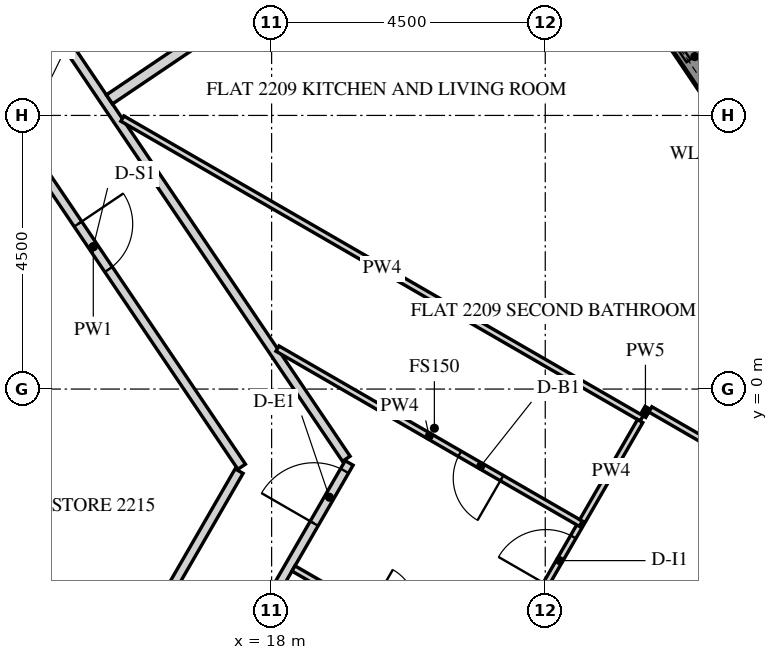
"""IFC4 building model, lengths in metres.
Left out: names, types, materials, properties, quantities, classifications, styles, units other than length and angle.
Written with IfcOpenShell. Run it as: python <this file> out.ifc"""

import sys

from ifc_helpers import new_model, si_unit, direction, frame, frame_2d, origin, place, context, subcontext, project, spatial, polyline, rectangle, outline, extrude, element, fill, save


model = new_model("IFC4")
c1 = context("Model", 3, precision=1e-05, world=origin(), true_north=direction((0.0, 1.0)))
c2 = subcontext(c1, "Body", "Model", "MODEL_VIEW")
j1 = project(units=[si_unit("LENGTHUNIT", "METRE"), si_unit("PLANEANGLEUNIT", "RADIAN")], contexts=[c1])
p1 = place(None, origin())
s1 = spatial("IfcSite", under=j1, at=p1, CompositionType="ELEMENT")
p2 = place(p1, origin())
s2 = spatial("IfcBuilding", under=s1, at=p2, CompositionType="ELEMENT")
p3 = place(p2, frame((0.0, 0.0, 279.6)))
s3 = spatial("IfcBuildingStorey", under=s2, at=p3, CompositionType="ELEMENT", Elevation=279.6)
p4 = place(p3, frame((16.451, -23.005, -0.15), z_axis=(0.0, 0.0, 1.0), x_axis=(0.500003737743, 0.866023245787, 0.0)))
e1 = element("IfcWall", 1, at=p4, inside=s3, PredefinedType="SOLIDWALL", context=c2, shape_type="SweptSolid", body=[
    extrude(outline(polyline([(-0.021, -0.25), (25.468, -0.25), (25.421, 0.25), (0.021, 0.25), (-0.021, -0.25)])), origin(), (0.0, 0.0, 1.0), 3.9),
])
p5 = place(p4, frame((2.522, 0.0, 0.75)))
e2 = element("IfcOpeningElement", 2, at=p5, cuts=e1, PredefinedType="OPENING", context=c2, shape_type="SweptSolid", body=[
    extrude(rectangle(XDim=2.4, YDim=2.7, at=frame_2d((1.2, 1.35))), frame((0.0, 0.26, 0.0), z_axis=(0.0, -1.0, 0.0), x_axis=(1.0, 0.0, 0.0)), (0.0, 0.0, 1.0), 0.52),
])
p6 = place(p4, frame((6.122, 0.0, 0.75)))
e3 = element("IfcOpeningElement", 3, at=p6, cuts=e1, PredefinedType="OPENING", context=c2, shape_type="SweptSolid", body=[
    extrude(rectangle(XDim=2.4, YDim=2.7, at=frame_2d((1.2, 1.35))), frame((0.0, 0.26, 0.0), z_axis=(0.0, -1.0, 0.0), x_axis=(1.0, 0.0, 0.0)), (0.0, 0.0, 1.0), 0.52),
])
p7 = place(p4, frame((9.722, 0.0, 0.75)))
e4 = element("IfcOpeningElement", 4, at=p7, cuts=e1, PredefinedType="OPENING", context=c2, shape_type="SweptSolid", body=[
    extrude(rectangle(XDim=2.4, YDim=2.7, at=frame_2d((1.2, 1.35))), frame((0.0, 0.26, 0.0), z_axis=(0.0, -1.0, 0.0), x_axis=(1.0, 0.0, 0.0)), (0.0, 0.0, 1.0), 0.52),
])
p8 = place(p4, frame((13.323, 0.0, 0.75)))
e5 = element("IfcOpeningElement", 5, at=p8, cuts=e1, PredefinedType="OPENING", context=c2, shape_type="SweptSolid", body=[
    extrude(rectangle(XDim=2.4, YDim=2.7, at=frame_2d((1.2, 1.35))), frame((0.0, 0.26, 0.0), z_axis=(0.0, -1.0, 0.0), x_axis=(1.0, 0.0, 0.0)), (0.0, 0.0, 1.0), 0.52),
])
p9 = place(p4, frame((16.922, 0.0, 0.75)))
e6 = element("IfcOpeningElement", 6, at=p9, cuts=e1, PredefinedType="OPENING", context=c2, shape_type="SweptSolid", body=[
    extrude(rectangle(XDim=2.4, YDim=2.7, at=frame_2d((1.2, 1.35))), frame((0.0, 0.26, 0.0), z_axis=(0.0, -1.0, 0.0), x_axis=(1.0, 0.0, 0.0)), (0.0, 0.0, 1.0), 0.52),
])
p10 = place(p4, frame((20.522, 0.0, 0.75)))
e7 = element("IfcOpeningElement", 7, at=p10, cuts=e1, PredefinedType="OPENING", context=c2, shape_type="SweptSolid", body=[
    extrude(rectangle(XDim=2.4, YDim=2.7, at=frame_2d((1.2, 1.35))), frame((0.0, 0.26, 0.0), z_axis=(0.0, -1.0, 0.0), x_axis=(1.0, 0.0, 0.0)), (0.0, 0.0, 1.0), 0.52),
])
p11 = place(p3, frame((26.706, 2.879, -0.15), z_axis=(0.0, 0.0, 1.0), x_axis=(-0.559197891507, 0.829034208061, 0.0)))
e8 = element("IfcWall", 8, at=p11, inside=s3, PredefinedType="SOLIDWALL", context=c2, shape_type="SweptSolid", body=[
    extrude(outline(polyline([(0.25, -0.25), (22.795, -0.25), (23.295, 0.25), (-0.25, 0.25), (0.25, -0.25)])), origin(), (0.0, 0.0, 1.0), 3.9),
])
p12 = place(p11, frame((1.323, 0.0, 1.05)))
e9 = element("IfcOpeningElement", 9, at=p12, cuts=e8, PredefinedType="OPENING", context=c2, shape_type="SweptSolid", body=[
    extrude(rectangle(XDim=0.9, YDim=1.5, at=frame_2d((0.45, 0.75))), frame((0.0, 0.26, 0.0), z_axis=(0.0, -1.0, 0.0), x_axis=(1.0, 0.0, 0.0)), (0.0, 0.0, 1.0), 0.52),
])
p13 = place(p11, frame((2.522, 0.0, 0.15)))
e10 = element("IfcOpeningElement", 10, at=p13, cuts=e8, PredefinedType="OPENING", context=c2, shape_type="SweptSolid", body=[
    extrude(rectangle(XDim=1.2, YDim=2.4, at=frame_2d((0.6, 1.2))), frame((0.0, 0.26, 0.0), z_axis=(0.0, -1.0, 0.0), x_axis=(1.0, 0.0, 0.0)), (0.0, 0.0, 1.0), 0.52),
])
p14 = place(p11, frame((4.922, 0.0, 1.05)))
e11 = element("IfcOpeningElement", 11, at=p14, cuts=e8, PredefinedType="OPENING", context=c2, shape_type="SweptSolid", body=[
    extrude(rectangle(XDim=0.9, YDim=1.5, at=frame_2d((0.45, 0.75))), frame((0.0, 0.26, 0.0), z_axis=(0.0, -1.0, 0.0), x_axis=(1.0, 0.0, 0.0)), (0.0, 0.0, 1.0), 0.52),
])
p15 = place(p11, frame((6.122, 0.0, 0.15)))
e12 = element("IfcOpeningElement", 12, at=p15, cuts=e8, PredefinedType="OPENING", context=c2, shape_type="SweptSolid", body=[
    extrude(rectangle(XDim=1.2, YDim=2.4, at=frame_2d((0.6, 1.2))), frame((0.0, 0.26, 0.0), z_axis=(0.0, -1.0, 0.0), x_axis=(1.0, 0.0, 0.0)), (0.0, 0.0, 1.0), 0.52),
])
p16 = place(p11, frame((8.522, 0.0, 1.05)))
e13 = element("IfcOpeningElement", 13, at=p16, cuts=e8, PredefinedType="OPENING", context=c2, shape_type="SweptSolid", body=[
    extrude(rectangle(XDim=0.9, YDim=1.5, at=frame_2d((0.45, 0.75))), frame((0.0, 0.26, 0.0), z_axis=(0.0, -1.0, 0.0), x_axis=(1.0, 0.0, 0.0)), (0.0, 0.0, 1.0), 0.52),
])
p17 = place(p11, frame((9.722, 0.0, 0.15)))
e14 = element("IfcOpeningElement", 14, at=p17, cuts=e8, PredefinedType="OPENING", context=c2, shape_type="SweptSolid", body=[
    extrude(rectangle(XDim=1.2, YDim=2.4, at=frame_2d((0.6, 1.2))), frame((0.0, 0.26, 0.0), z_axis=(0.0, -1.0, 0.0), x_axis=(1.0, 0.0, 0.0)), (0.0, 0.0, 1.0), 0.52),
])
p18 = place(p11, frame((12.122, 0.0, 1.05)))
e15 = element("IfcOpeningElement", 15, at=p18, cuts=e8, PredefinedType="OPENING", context=c2, shape_type="SweptSolid", body=[
    extrude(rectangle(XDim=0.9, YDim=1.5, at=frame_2d((0.45, 0.75))), frame((0.0, 0.26, 0.0), z_axis=(0.0, -1.0, 0.0), x_axis=(1.0, 0.0, 0.0)), (0.0, 0.0, 1.0), 0.52),
])
p19 = place(p11, frame((13.323, 0.0, 0.15)))
e16 = element("IfcOpeningElement", 16, at=p19, cuts=e8, PredefinedType="OPENING", context=c2, shape_type="SweptSolid", body=[
    extrude(rectangle(XDim=1.2, YDim=2.4, at=frame_2d((0.6, 1.2))), frame((0.0, 0.26, 0.0), z_axis=(0.0, -1.0, 0.0), x_axis=(1.0, 0.0, 0.0)), (0.0, 0.0, 1.0), 0.52),
])
p20 = place(p11, frame((15.722, 0.0, 1.05)))
e17 = element("IfcOpeningElement", 17, at=p20, cuts=e8, PredefinedType="OPENING", context=c2, shape_type="SweptSolid", body=[
    extrude(rectangle(XDim=0.9, YDim=1.5, at=frame_2d((0.45, 0.75))), frame((0.0, 0.26, 0.0), z_axis=(0.0, -1.0, 0.0), x_axis=(1.0, 0.0, 0.0)), (0.0, 0.0, 1.0), 0.52),
])
p21 = place(p11, frame((16.922, 0.0, 0.15)))
e18 = element("IfcOpeningElement", 18, at=p21, cuts=e8, PredefinedType="OPENING", context=c2, shape_type="SweptSolid", body=[
    extrude(rectangle(XDim=1.2, YDim=2.4, at=frame_2d((0.6, 1.2))), frame((0.0, 0.26, 0.0), z_axis=(0.0, -1.0, 0.0), x_axis=(1.0, 0.0, 0.0)), (0.0, 0.0, 1.0), 0.52),
])
p22 = place(p11, frame((19.323, 0.0, 1.05)))
e19 = element("IfcOpeningElement", 19, at=p22, cuts=e8, PredefinedType="OPENING", context=c2, shape_type="SweptSolid", body=[
    extrude(rectangle(XDim=0.9, YDim=1.5, at=frame_2d((0.45, 0.75))), frame((0.0, 0.26, 0.0), z_axis=(0.0, -1.0, 0.0), x_axis=(1.0, 0.0, 0.0)), (0.0, 0.0, 1.0), 0.52),
])
p23 = place(p11, frame((20.522, 0.0, 0.15)))
e20 = element("IfcOpeningElement", 20, at=p23, cuts=e8, PredefinedType="OPENING", context=c2, shape_type="SweptSolid", body=[
    extrude(rectangle(XDim=1.2, YDim=2.4, at=frame_2d((0.6, 1.2))), frame((0.0, 0.26, 0.0), z_axis=(0.0, -1.0, 0.0), x_axis=(1.0, 0.0, 0.0)), (0.0, 0.0, 1.0), 0.52),
])
p24 = place(p3, frame((11.627, -14.462, 0.0), z_axis=(0.0, 0.0, 1.0), x_axis=(0.499994634027, 0.866028501808, 0.0)))
e21 = element("IfcWall", 21, at=p24, inside=s3, PredefinedType="PARTITIONING", context=c2, shape_type="SweptSolid", body=[
    extrude(rectangle(XDim=15.296, YDim=0.15, at=frame_2d((7.648, 0.0))), origin(), (0.0, 0.0, 1.0), 2.988),
])
p25 = place(p24, frame((0.525, 0.0, 0.0)))
e22 = element("IfcOpeningElement", 22, at=p25, cuts=e21, PredefinedType="OPENING", context=c2, shape_type="SweptSolid", body=[
    extrude(rectangle(XDim=1.0, YDim=2.1, at=frame_2d((0.5, 1.05))), frame((0.0, 0.085, 0.0), z_axis=(0.0, -1.0, 0.0), x_axis=(1.0, 0.0, 0.0)), (0.0, 0.0, 1.0), 0.17),
])
p26 = place(p24, frame((14.146, 0.0, 0.0)))
e23 = element("IfcOpeningElement", 23, at=p26, cuts=e21, PredefinedType="OPENING", context=c2, shape_type="SweptSolid", body=[
    extrude(rectangle(XDim=1.0, YDim=2.1, at=frame_2d((0.5, 1.05))), frame((0.0, 0.085, 0.0), z_axis=(0.0, -1.0, 0.0), x_axis=(1.0, 0.0, 0.0)), (0.0, 0.0, 1.0), 0.17),
])
p27 = place(p3, frame((19.228, -1.146, 0.0), z_axis=(0.0, 0.0, 1.0), x_axis=(-0.559173750718, 0.829050490928, 0.0)))
e24 = element("IfcWall", 24, at=p27, inside=s3, PredefinedType="PARTITIONING", context=c2, shape_type="SweptSolid", body=[
    extrude(rectangle(XDim=17.273, YDim=0.15, at=frame_2d((8.637, 0.0))), origin(), (0.0, 0.0, 1.0), 2.988),
])
p28 = place(p27, frame((9.478, 0.0, 0.0)))
e25 = element("IfcOpeningElement", 25, at=p28, cuts=e24, PredefinedType="OPENING", context=c2, shape_type="SweptSolid", body=[
    extrude(rectangle(XDim=1.0, YDim=2.1, at=frame_2d((0.5, 1.05))), frame((0.0, 0.085, 0.0), z_axis=(0.0, -1.0, 0.0), x_axis=(1.0, 0.0, 0.0)), (0.0, 0.0, 1.0), 0.17),
])
p29 = place(p3, frame((12.627, 5.958, 0.0), z_axis=(0.0, 0.0, 1.0), x_axis=(0.559185493191, -0.829042570804, 0.0)))
e26 = element("IfcWall", 26, at=p29, inside=s3, PredefinedType="PARTITIONING", context=c2, shape_type="SweptSolid", body=[
    extrude(rectangle(XDim=8.727, YDim=0.15, at=frame_2d((4.363, 0.0))), origin(), (0.0, 0.0, 1.0), 2.988),
])
p30 = place(p29, frame((3.913, 0.0, 0.0)))
e27 = element("IfcOpeningElement", 27, at=p30, cuts=e26, PredefinedType="OPENING", context=c2, shape_type="SweptSolid", body=[
    extrude(rectangle(XDim=0.9, YDim=2.1, at=frame_2d((0.45, 1.05))), frame((0.0, 0.085, 0.0), z_axis=(0.0, -1.0, 0.0), x_axis=(1.0, 0.0, 0.0)), (0.0, 0.0, 1.0), 0.17),
])
p31 = place(p3, frame((17.465, -1.349, 0.0), z_axis=(0.0, 0.0, 1.0), x_axis=(-0.500001610943, -0.866024473704, 0.0)))
e28 = element("IfcWall", 28, at=p31, inside=s3, PredefinedType="PARTITIONING", context=c2, shape_type="SweptSolid", body=[
    extrude(rectangle(XDim=6.485, YDim=0.15, at=frame_2d((3.243, 0.0))), origin(), (0.0, 0.0, 1.0), 2.988),
])
p32 = place(p3, frame((24.11, -0.441, 0.0), z_axis=(0.0, 0.0, 1.0), x_axis=(0.499074005857, 0.866559367082, 0.0)))
e29 = element("IfcWall", 29, at=p32, inside=s3, PredefinedType="PARTITIONING", context=c2, shape_type="SweptSolid", body=[
    extrude(rectangle(XDim=0.152, YDim=0.1, at=frame_2d((0.076, 0.0))), origin(), (0.0, 0.0, 1.0), 2.988),
])
p33 = place(p3, frame((24.229, -0.334, 0.0), z_axis=(0.0, 0.0, 1.0), x_axis=(0.866027639635, -0.499996127374, 0.0)))
e30 = element("IfcWall", 30, at=p33, inside=s3, PredefinedType="PARTITIONING", context=c2, shape_type="SweptSolid", body=[
    extrude(rectangle(XDim=4.35, YDim=0.1, at=frame_2d((2.175, 0.0))), origin(), (0.0, 0.0, 1.0), 2.988),
])
p34 = place(p33, frame((1.725, 0.0, 0.0)))
e31 = element("IfcOpeningElement", 31, at=p34, cuts=e30, PredefinedType="OPENING", context=c2, shape_type="SweptSolid", body=[
    extrude(rectangle(XDim=0.9, YDim=2.1, at=frame_2d((0.45, 1.05))), frame((0.0, 0.06, 0.0), z_axis=(0.0, -1.0, 0.0), x_axis=(1.0, 0.0, 0.0)), (0.0, 0.0, 1.0), 0.12),
])
p35 = place(p3, frame((15.545, 4.448, 0.0), z_axis=(0.0, 0.0, 1.0), x_axis=(0.866022320763, -0.500005339912, 0.0)))
e32 = element("IfcWall", 32, at=p35, inside=s3, PredefinedType="PARTITIONING", context=c2, shape_type="SweptSolid", body=[
    extrude(rectangle(XDim=9.861, YDim=0.1, at=frame_2d((4.931, 0.0))), origin(), (0.0, 0.0, 1.0), 2.988),
])
p36 = place(p3, frame((22.069, 9.307, 0.0), z_axis=(0.0, 0.0, 1.0), x_axis=(-0.829042649773, -0.559185376111, 0.0)))
e33 = element("IfcWall", 33, at=p36, inside=s3, PredefinedType="PARTITIONING", context=c2, shape_type="SweptSolid", body=[
    extrude(rectangle(XDim=8.125, YDim=0.18, at=frame_2d((4.062, 0.0))), origin(), (0.0, 0.0, 1.0), 2.988),
])
p37 = place(p3, frame((18.36, -2.95, 0.0), z_axis=(0.0, 0.0, 1.0), x_axis=(0.866012039196, -0.500023147432, 0.0)))
e34 = element("IfcWall", 34, at=p37, inside=s3, PredefinedType="PARTITIONING", context=c2, shape_type="SweptSolid", body=[
    extrude(rectangle(XDim=3.725, YDim=0.1, at=frame_2d((1.862, 0.0))), origin(), (0.0, 0.0, 1.0), 2.988),
])
p38 = place(p37, frame((1.425, 0.0, 0.0)))
e35 = element("IfcOpeningElement", 35, at=p38, cuts=e34, PredefinedType="OPENING", context=c2, shape_type="SweptSolid", body=[
    extrude(rectangle(XDim=0.8, YDim=2.1, at=frame_2d((0.4, 1.05))), frame((0.0, 0.06, 0.0), z_axis=(0.0, -1.0, 0.0), x_axis=(1.0, 0.0, 0.0)), (0.0, 0.0, 1.0), 0.12),
])
p39 = place(p3, frame((21.61, -4.771, 0.0), z_axis=(0.0, 0.0, 1.0), x_axis=(0.499934698534, 0.866063102321, 0.0)))
e36 = element("IfcWall", 36, at=p39, inside=s3, PredefinedType="PARTITIONING", context=c2, shape_type="SweptSolid", body=[
    extrude(rectangle(XDim=2.954, YDim=0.1, at=frame_2d((1.477, 0.0))), origin(), (0.0, 0.0, 1.0), 2.988),
])
p40 = place(p39, frame((0.452, 0.0, 0.0)))
e37 = element("IfcOpeningElement", 37, at=p40, cuts=e36, PredefinedType="OPENING", context=c2, shape_type="SweptSolid", body=[
    extrude(rectangle(XDim=0.9, YDim=2.1, at=frame_2d((0.45, 1.05))), frame((0.0, 0.06, 0.0), z_axis=(0.0, -1.0, 0.0), x_axis=(1.0, 0.0, 0.0)), (0.0, 0.0, 1.0), 0.12),
])
p41 = place(p39, frame((1.802, 0.0, 0.0)))
e38 = element("IfcOpeningElement", 38, at=p41, cuts=e36, PredefinedType="OPENING", context=c2, shape_type="SweptSolid", body=[
    extrude(rectangle(XDim=0.9, YDim=2.1, at=frame_2d((0.45, 1.05))), frame((0.0, 0.06, 0.0), z_axis=(0.0, -1.0, 0.0), x_axis=(1.0, 0.0, 0.0)), (0.0, 0.0, 1.0), 0.12),
])
p42 = place(p3, frame((23.085, -2.215, 0.0), z_axis=(0.0, 0.0, 1.0), x_axis=(-0.866017611601, 0.500013496215, 0.0)))
e39 = element("IfcWall", 39, at=p42, inside=s3, PredefinedType="PARTITIONING", context=c2, shape_type="SweptSolid", body=[
    extrude(rectangle(XDim=5.76, YDim=0.1, at=frame_2d((2.88, 0.0))), origin(), (0.0, 0.0, 1.0), 2.988),
])
p43 = place(p42, frame((1.5, 0.0, 0.0)))
e40 = element("IfcOpeningElement", 40, at=p43, cuts=e39, PredefinedType="OPENING", context=c2, shape_type="SweptSolid", body=[
    extrude(rectangle(XDim=0.8, YDim=2.1, at=frame_2d((0.4, 1.05))), frame((0.0, 0.06, 0.0), z_axis=(0.0, -1.0, 0.0), x_axis=(1.0, 0.0, 0.0)), (0.0, 0.0, 1.0), 0.12),
])
p44 = place(p3, frame((24.061, -0.526, 0.0), z_axis=(0.0, 0.0, 1.0), x_axis=(-0.499967155389, -0.866044365799, 0.0)))
e41 = element("IfcWall", 41, at=p44, inside=s3, PredefinedType="PARTITIONING", context=c2, shape_type="SweptSolid", body=[
    extrude(rectangle(XDim=1.9, YDim=0.1, at=frame_2d((0.95, 0.0))), origin(), (0.0, 0.0, 1.0), 2.988),
])
p45 = place(p13, frame((0.0, 0.175, 0.0)))
e42 = element("IfcDoor", 42, at=p45, inside=s3, OperationType="SLIDING_TO_LEFT", PredefinedType="DOOR", context=c2, shape_type="SweptSolid", body=[
    extrude(rectangle(XDim=1.2, YDim=2.4, at=frame_2d((0.6, 1.2))), frame((0.0, 0.025, 0.0), z_axis=(0.0, -1.0, 0.0), x_axis=(1.0, 0.0, 0.0)), (0.0, 0.0, 1.0), 0.05),
])
fill(e10, e42)
p46 = place(p26, origin())
e43 = element("IfcDoor", 43, at=p46, inside=s3, OperationType="SINGLE_SWING_LEFT", PredefinedType="DOOR", context=c2, shape_type="SweptSolid", body=[
    extrude(rectangle(XDim=1.0, YDim=2.1, at=frame_2d((0.5, 1.05))), frame((0.0, 0.025, 0.0), z_axis=(0.0, -1.0, 0.0), x_axis=(1.0, 0.0, 0.0)), (0.0, 0.0, 1.0), 0.05),
])
fill(e23, e43)
p47 = place(p41, origin())
e44 = element("IfcDoor", 44, at=p47, inside=s3, OperationType="SINGLE_SWING_LEFT", PredefinedType="DOOR", context=c2, shape_type="SweptSolid", body=[
    extrude(rectangle(XDim=0.9, YDim=2.1, at=frame_2d((0.45, 1.05))), frame((0.0, 0.025, 0.0), z_axis=(0.0, -1.0, 0.0), x_axis=(1.0, 0.0, 0.0)), (0.0, 0.0, 1.0), 0.05),
])
fill(e38, e44)
p48 = place(p43, origin())
e45 = element("IfcDoor", 45, at=p48, inside=s3, OperationType="SINGLE_SWING_RIGHT", PredefinedType="DOOR", context=c2, shape_type="SweptSolid", body=[
    extrude(rectangle(XDim=0.8, YDim=2.1, at=frame_2d((0.4, 1.05))), frame((0.0, 0.025, 0.0), z_axis=(0.0, -1.0, 0.0), x_axis=(1.0, 0.0, 0.0)), (0.0, 0.0, 1.0), 0.05),
])
fill(e40, e45)
p49 = place(p30, origin())
e46 = element("IfcDoor", 46, at=p49, inside=s3, OperationType="SINGLE_SWING_RIGHT", PredefinedType="DOOR", context=c2, shape_type="SweptSolid", body=[
    extrude(rectangle(XDim=0.9, YDim=2.1, at=frame_2d((0.45, 1.05))), frame((0.0, 0.025, 0.0), z_axis=(0.0, -1.0, 0.0), x_axis=(1.0, 0.0, 0.0)), (0.0, 0.0, 1.0), 0.05),
])
fill(e27, e46)
save(model, sys.argv[1])
